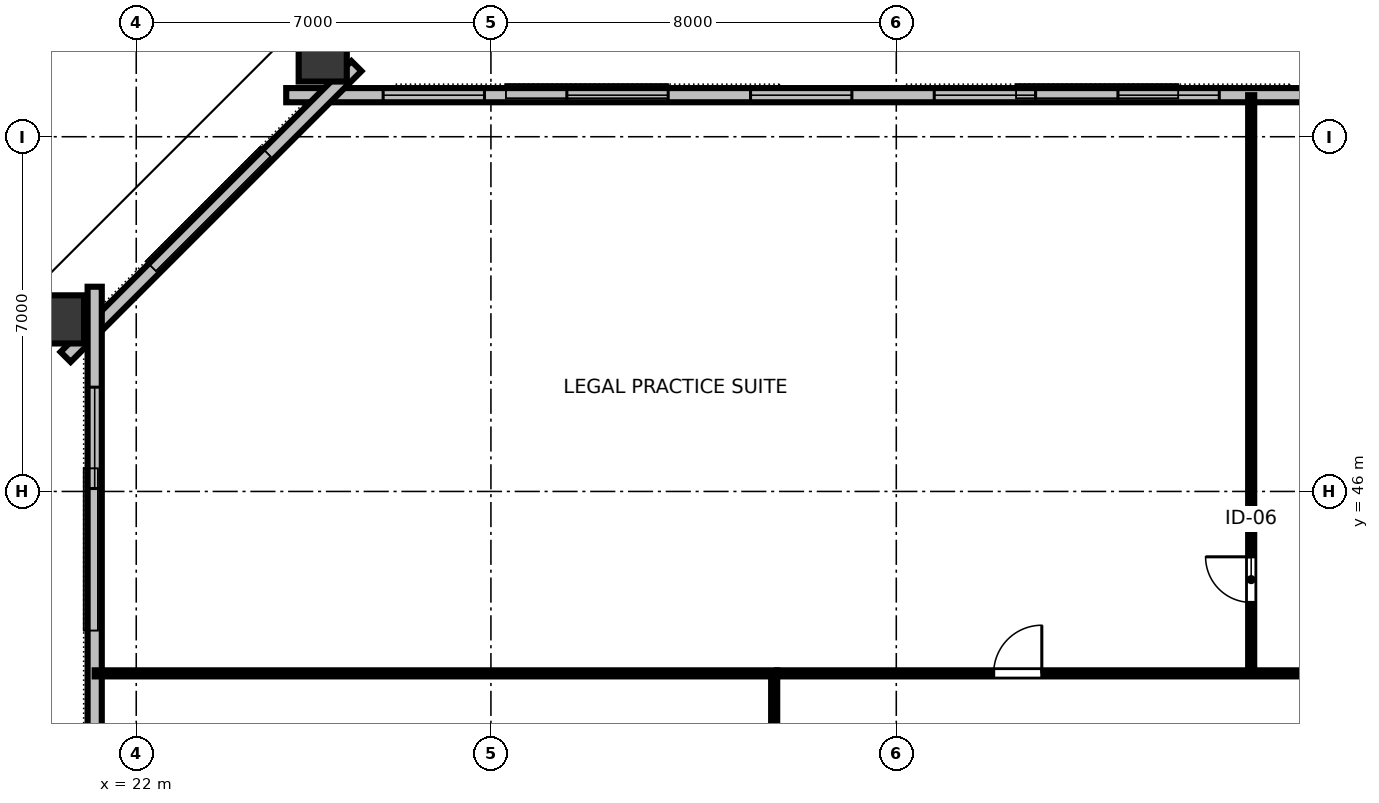
"""IFC4 building model, lengths in metres.
Left out: names, types, materials, properties, quantities, classifications, styles, units other than length and angle.
Written with IfcOpenShell. Run it as: python <this file> out.ifc"""

import sys

from ifc_helpers import new_model, si_unit, direction, frame, frame_2d, origin, origin_2d, place, context, subcontext, project, spatial, rectangle, hollow_rectangle, extrude, element, fill, save


model = new_model("IFC4")
c1 = context("Model", 3, precision=1e-05, world=origin(), true_north=direction((0.0, 1.0)))
c2 = subcontext(c1, "Body", "Model", "MODEL_VIEW")
j1 = project(units=[si_unit("LENGTHUNIT", "METRE"), si_unit("PLANEANGLEUNIT", "RADIAN")], contexts=[c1])
p1 = place(None, origin())
s1 = spatial("IfcSite", under=j1, at=p1, CompositionType="ELEMENT")
p2 = place(p1, origin())
s2 = spatial("IfcBuilding", under=s1, at=p2, CompositionType="ELEMENT")
p3 = place(p2, frame((0.0, 0.0, 74.8)))
s3 = spatial("IfcBuildingStorey", under=s2, at=p3, CompositionType="ELEMENT", Elevation=74.8)
for number, where, z_axis, x_axis in (
    (1, (25.681, 54.664, 0.0), (0.0, 0.0, 1.0), (1.0, 0.0, 0.0)),
    (2, (20.396, 49.396, 0.0), (0.0, 0.0, 1.0), (0.0, 1.0, 0.0)),
):
    element("IfcColumn", number, at=place(p3, frame(where, z_axis=z_axis, x_axis=x_axis)), inside=s3, PredefinedType="COLUMN", context=c2, shape_type="SweptSolid", body=[
        extrude(hollow_rectangle(XDim=0.95, YDim=1.15, WallThickness=0.06, at=origin_2d()), origin(), (0.0, 0.0, 1.0), 3.358),
    ])
p4 = place(p3, frame((67.04, 53.82, 0.0), z_axis=(0.0, 0.0, 1.0), x_axis=(-1.0, 0.0, 0.0)))
e3 = element("IfcWall", 3, at=p4, inside=s3, PredefinedType="STANDARD", context=c2, shape_type="SweptSolid", body=[
    extrude(rectangle(XDim=42.08, YDim=0.28, at=frame_2d((21.04, 0.0))), origin(), (0.0, 0.0, 1.0), 3.36),
])
p5 = place(p4, frame((1.913, 0.0, 0.8)))
e4 = element("IfcOpeningElement", 4, at=p5, cuts=e3, PredefinedType="OPENING", context=c2, shape_type="SweptSolid", body=[
    extrude(rectangle(XDim=2.0, YDim=1.95, at=frame_2d((1.0, 0.975))), frame((0.0, 0.15, 0.0), z_axis=(0.0, -1.0, 0.0), x_axis=(1.0, 0.0, 0.0)), (0.0, 0.0, 1.0), 0.3),
])
p6 = place(p4, frame((5.538, 0.0, 0.8)))
e5 = element("IfcOpeningElement", 5, at=p6, cuts=e3, PredefinedType="OPENING", context=c2, shape_type="SweptSolid", body=[
    extrude(rectangle(XDim=2.0, YDim=1.95, at=frame_2d((1.0, 0.975))), frame((0.0, 0.15, 0.0), z_axis=(0.0, -1.0, 0.0), x_axis=(1.0, 0.0, 0.0)), (0.0, 0.0, 1.0), 0.3),
])
p7 = place(p4, frame((9.164, 0.0, 0.8)))
e6 = element("IfcOpeningElement", 6, at=p7, cuts=e3, PredefinedType="OPENING", context=c2, shape_type="SweptSolid", body=[
    extrude(rectangle(XDim=2.0, YDim=1.95, at=frame_2d((1.0, 0.975))), frame((0.0, 0.15, 0.0), z_axis=(0.0, -1.0, 0.0), x_axis=(1.0, 0.0, 0.0)), (0.0, 0.0, 1.0), 0.3),
])
p8 = place(p4, frame((12.789, 0.0, 0.8)))
e7 = element("IfcOpeningElement", 7, at=p8, cuts=e3, PredefinedType="OPENING", context=c2, shape_type="SweptSolid", body=[
    extrude(rectangle(XDim=2.0, YDim=1.95, at=frame_2d((1.0, 0.975))), frame((0.0, 0.15, 0.0), z_axis=(0.0, -1.0, 0.0), x_axis=(1.0, 0.0, 0.0)), (0.0, 0.0, 1.0), 0.3),
])
p9 = place(p4, frame((23.666, 0.0, 0.8)))
e8 = element("IfcOpeningElement", 8, at=p9, cuts=e3, PredefinedType="OPENING", context=c2, shape_type="SweptSolid", body=[
    extrude(rectangle(XDim=2.0, YDim=1.95, at=frame_2d((1.0, 0.975))), frame((0.0, 0.15, 0.0), z_axis=(0.0, -1.0, 0.0), x_axis=(1.0, 0.0, 0.0)), (0.0, 0.0, 1.0), 0.3),
])
p10 = place(p4, frame((27.291, 0.0, 0.8)))
e9 = element("IfcOpeningElement", 9, at=p10, cuts=e3, PredefinedType="OPENING", context=c2, shape_type="SweptSolid", body=[
    extrude(rectangle(XDim=2.0, YDim=1.95, at=frame_2d((1.0, 0.975))), frame((0.0, 0.15, 0.0), z_axis=(0.0, -1.0, 0.0), x_axis=(1.0, 0.0, 0.0)), (0.0, 0.0, 1.0), 0.3),
])
p11 = place(p4, frame((30.917, 0.0, 0.8)))
e10 = element("IfcOpeningElement", 10, at=p11, cuts=e3, PredefinedType="OPENING", context=c2, shape_type="SweptSolid", body=[
    extrude(rectangle(XDim=2.0, YDim=1.95, at=frame_2d((1.0, 0.975))), frame((0.0, 0.15, 0.0), z_axis=(0.0, -1.0, 0.0), x_axis=(1.0, 0.0, 0.0)), (0.0, 0.0, 1.0), 0.3),
])
p12 = place(p4, frame((34.542, 0.0, 0.8)))
e11 = element("IfcOpeningElement", 11, at=p12, cuts=e3, PredefinedType="OPENING", context=c2, shape_type="SweptSolid", body=[
    extrude(rectangle(XDim=2.0, YDim=1.95, at=frame_2d((1.0, 0.975))), frame((0.0, 0.15, 0.0), z_axis=(0.0, -1.0, 0.0), x_axis=(1.0, 0.0, 0.0)), (0.0, 0.0, 1.0), 0.3),
])
p13 = place(p4, frame((38.167, 0.0, 0.8)))
e12 = element("IfcOpeningElement", 12, at=p13, cuts=e3, PredefinedType="OPENING", context=c2, shape_type="SweptSolid", body=[
    extrude(rectangle(XDim=2.0, YDim=1.95, at=frame_2d((1.0, 0.975))), frame((0.0, 0.15, 0.0), z_axis=(0.0, -1.0, 0.0), x_axis=(1.0, 0.0, 0.0)), (0.0, 0.0, 1.0), 0.3),
])
p14 = place(p3, frame((26.345, 54.394, 0.0), z_axis=(0.0, 0.0, 1.0), x_axis=(-0.707106781187, -0.707106781187, 0.0)))
e13 = element("IfcWall", 13, at=p14, inside=s3, PredefinedType="STANDARD", context=c2, shape_type="SweptSolid", body=[
    extrude(rectangle(XDim=8.116, YDim=0.28, at=frame_2d((4.058, 0.0))), origin(), (0.0, 0.0, 1.0), 3.36),
])
p15 = place(p3, frame((21.18, 50.04, 0.0), z_axis=(0.0, 0.0, 1.0), x_axis=(0.0, -1.0, 0.0)))
e14 = element("IfcWall", 14, at=p15, inside=s3, PredefinedType="STANDARD", context=c2, shape_type="SweptSolid", body=[
    extrude(rectangle(XDim=36.08, YDim=0.28, at=frame_2d((18.04, 0.0))), origin(), (0.0, 0.0, 1.0), 3.36),
])
p16 = place(p15, frame((1.982, 0.0, 0.8)))
e15 = element("IfcOpeningElement", 15, at=p16, cuts=e14, PredefinedType="OPENING", context=c2, shape_type="SweptSolid", body=[
    extrude(rectangle(XDim=2.0, YDim=1.95, at=frame_2d((1.0, 0.975))), frame((0.0, 0.15, 0.0), z_axis=(0.0, -1.0, 0.0), x_axis=(1.0, 0.0, 0.0)), (0.0, 0.0, 1.0), 0.3),
])
p17 = place(p15, frame((9.511, 0.0, 0.8)))
e16 = element("IfcOpeningElement", 16, at=p17, cuts=e14, PredefinedType="OPENING", context=c2, shape_type="SweptSolid", body=[
    extrude(rectangle(XDim=2.0, YDim=1.95, at=frame_2d((1.0, 0.975))), frame((0.0, 0.15, 0.0), z_axis=(0.0, -1.0, 0.0), x_axis=(1.0, 0.0, 0.0)), (0.0, 0.0, 1.0), 0.3),
])
p18 = place(p15, frame((13.276, 0.0, 0.8)))
e17 = element("IfcOpeningElement", 17, at=p18, cuts=e14, PredefinedType="OPENING", context=c2, shape_type="SweptSolid", body=[
    extrude(rectangle(XDim=2.0, YDim=1.95, at=frame_2d((1.0, 0.975))), frame((0.0, 0.15, 0.0), z_axis=(0.0, -1.0, 0.0), x_axis=(1.0, 0.0, 0.0)), (0.0, 0.0, 1.0), 0.3),
])
p19 = place(p15, frame((20.804, 0.0, 0.8)))
e18 = element("IfcOpeningElement", 18, at=p19, cuts=e14, PredefinedType="OPENING", context=c2, shape_type="SweptSolid", body=[
    extrude(rectangle(XDim=2.0, YDim=1.95, at=frame_2d((1.0, 0.975))), frame((0.0, 0.15, 0.0), z_axis=(0.0, -1.0, 0.0), x_axis=(1.0, 0.0, 0.0)), (0.0, 0.0, 1.0), 0.3),
])
p20 = place(p15, frame((24.569, 0.0, 0.8)))
e19 = element("IfcOpeningElement", 19, at=p20, cuts=e14, PredefinedType="OPENING", context=c2, shape_type="SweptSolid", body=[
    extrude(rectangle(XDim=2.0, YDim=1.95, at=frame_2d((1.0, 0.975))), frame((0.0, 0.15, 0.0), z_axis=(0.0, -1.0, 0.0), x_axis=(1.0, 0.0, 0.0)), (0.0, 0.0, 1.0), 0.3),
])
p21 = place(p15, frame((32.098, 0.0, 0.8)))
e20 = element("IfcOpeningElement", 20, at=p21, cuts=e14, PredefinedType="OPENING", context=c2, shape_type="SweptSolid", body=[
    extrude(rectangle(XDim=2.0, YDim=1.95, at=frame_2d((1.0, 0.975))), frame((0.0, 0.15, 0.0), z_axis=(0.0, -1.0, 0.0), x_axis=(1.0, 0.0, 0.0)), (0.0, 0.0, 1.0), 0.3),
])
p22 = place(p3, frame((44.004, 42.41, 0.0), z_axis=(0.0, 0.0, 1.0), x_axis=(0.0, 1.0, 0.0)))
e21 = element("IfcWall", 21, at=p22, inside=s3, PredefinedType="PARTITIONING", context=c2, shape_type="SweptSolid", body=[
    extrude(rectangle(XDim=11.41, YDim=0.12, at=frame_2d((5.705, 0.0))), origin(), (0.0, 0.0, 1.0), 2.64),
])
p23 = place(p22, frame((1.4, 0.0, 0.0)))
e22 = element("IfcOpeningElement", 22, at=p23, cuts=e21, PredefinedType="OPENING", context=c2, shape_type="SweptSolid", body=[
    extrude(rectangle(XDim=0.9, YDim=2.15, at=frame_2d((0.45, 1.075))), frame((0.0, 0.07, 0.0), z_axis=(0.0, -1.0, 0.0), x_axis=(1.0, 0.0, 0.0)), (0.0, 0.0, 1.0), 0.14),
])
p24 = place(p3, frame((34.65, 42.41, 0.0), z_axis=(0.0, 0.0, 1.0), x_axis=(1.0, 0.0, 0.0)))
e23 = element("IfcWall", 23, at=p24, inside=s3, PredefinedType="PARTITIONING", context=c2, shape_type="SweptSolid", body=[
    extrude(rectangle(XDim=22.7, YDim=0.12, at=frame_2d((11.35, 0.0))), origin(), (0.0, 0.0, 1.0), 2.64),
])
p25 = place(p24, frame((4.272, 0.0, 0.0)))
e24 = element("IfcOpeningElement", 24, at=p25, cuts=e23, PredefinedType="OPENING", context=c2, shape_type="SweptSolid", body=[
    extrude(rectangle(XDim=0.95, YDim=2.15, at=frame_2d((0.475, 1.075))), frame((0.0, 0.07, 0.0), z_axis=(0.0, -1.0, 0.0), x_axis=(1.0, 0.0, 0.0)), (0.0, 0.0, 1.0), 0.14),
])
p26 = place(p24, frame((11.432, 0.0, 0.0)))
e25 = element("IfcOpeningElement", 25, at=p26, cuts=e23, PredefinedType="OPENING", context=c2, shape_type="SweptSolid", body=[
    extrude(rectangle(XDim=0.95, YDim=2.15, at=frame_2d((0.475, 1.075))), frame((0.0, 0.07, 0.0), z_axis=(0.0, -1.0, 0.0), x_axis=(1.0, 0.0, 0.0)), (0.0, 0.0, 1.0), 0.14),
])
p27 = place(p24, frame((18.035, 0.0, 0.0)))
e26 = element("IfcOpeningElement", 26, at=p27, cuts=e23, PredefinedType="OPENING", context=c2, shape_type="SweptSolid", body=[
    extrude(rectangle(XDim=0.95, YDim=2.15, at=frame_2d((0.475, 1.075))), frame((0.0, 0.07, 0.0), z_axis=(0.0, -1.0, 0.0), x_axis=(1.0, 0.0, 0.0)), (0.0, 0.0, 1.0), 0.14),
])
p28 = place(p3, frame((34.59, 21.65, 0.0), z_axis=(0.0, 0.0, 1.0), x_axis=(0.0, 1.0, 0.0)))
e27 = element("IfcWall", 27, at=p28, inside=s3, PredefinedType="PARTITIONING", context=c2, shape_type="SweptSolid", body=[
    extrude(rectangle(XDim=20.7, YDim=0.12, at=frame_2d((10.35, 0.0))), origin(), (0.0, 0.0, 1.0), 2.64),
])
p29 = place(p28, frame((2.105, 0.0, 0.0)))
e28 = element("IfcOpeningElement", 28, at=p29, cuts=e27, PredefinedType="OPENING", context=c2, shape_type="SweptSolid", body=[
    extrude(rectangle(XDim=0.95, YDim=2.15, at=frame_2d((0.475, 1.075))), frame((0.0, 0.07, 0.0), z_axis=(0.0, -1.0, 0.0), x_axis=(1.0, 0.0, 0.0)), (0.0, 0.0, 1.0), 0.14),
])
p30 = place(p28, frame((7.369, 0.0, 0.0)))
e29 = element("IfcOpeningElement", 29, at=p30, cuts=e27, PredefinedType="OPENING", context=c2, shape_type="SweptSolid", body=[
    extrude(rectangle(XDim=0.95, YDim=2.15, at=frame_2d((0.475, 1.075))), frame((0.0, 0.07, 0.0), z_axis=(0.0, -1.0, 0.0), x_axis=(1.0, 0.0, 0.0)), (0.0, 0.0, 1.0), 0.14),
])
p31 = place(p28, frame((15.139, 0.0, 0.0)))
e30 = element("IfcOpeningElement", 30, at=p31, cuts=e27, PredefinedType="OPENING", context=c2, shape_type="SweptSolid", body=[
    extrude(rectangle(XDim=0.95, YDim=2.15, at=frame_2d((0.475, 1.075))), frame((0.0, 0.07, 0.0), z_axis=(0.0, -1.0, 0.0), x_axis=(1.0, 0.0, 0.0)), (0.0, 0.0, 1.0), 0.14),
])
p32 = place(p3, frame((34.65, 42.41, 0.0), z_axis=(0.0, 0.0, 1.0), x_axis=(-1.0, 0.0, 0.0)))
e31 = element("IfcWall", 31, at=p32, inside=s3, PredefinedType="PARTITIONING", context=c2, shape_type="SweptSolid", body=[
    extrude(rectangle(XDim=13.47, YDim=0.12, at=frame_2d((6.735, 0.0))), origin(), (0.0, 0.0, 1.0), 2.64),
])
p33 = place(p9, origin())
e32 = element("IfcWindow", 32, at=p33, inside=s3, PartitioningType="SINGLE_PANEL", PredefinedType="WINDOW", context=c2, shape_type="SweptSolid", body=[
    extrude(rectangle(XDim=2.0, YDim=1.95, at=frame_2d((1.0, 0.975))), frame((0.0, 0.03, 0.0), z_axis=(0.0, -1.0, 0.0), x_axis=(1.0, 0.0, 0.0)), (0.0, 0.0, 1.0), 0.06),
])
fill(e8, e32)
p34 = place(p10, origin())
e33 = element("IfcWindow", 33, at=p34, inside=s3, PartitioningType="SINGLE_PANEL", PredefinedType="WINDOW", context=c2, shape_type="SweptSolid", body=[
    extrude(rectangle(XDim=2.0, YDim=1.95, at=frame_2d((1.0, 0.975))), frame((0.0, 0.03, 0.0), z_axis=(0.0, -1.0, 0.0), x_axis=(1.0, 0.0, 0.0)), (0.0, 0.0, 1.0), 0.06),
])
fill(e9, e33)
p35 = place(p11, origin())
e34 = element("IfcWindow", 34, at=p35, inside=s3, PartitioningType="SINGLE_PANEL", PredefinedType="WINDOW", context=c2, shape_type="SweptSolid", body=[
    extrude(rectangle(XDim=2.0, YDim=1.95, at=frame_2d((1.0, 0.975))), frame((0.0, 0.03, 0.0), z_axis=(0.0, -1.0, 0.0), x_axis=(1.0, 0.0, 0.0)), (0.0, 0.0, 1.0), 0.06),
])
fill(e10, e34)
p36 = place(p12, origin())
e35 = element("IfcWindow", 35, at=p36, inside=s3, PartitioningType="SINGLE_PANEL", PredefinedType="WINDOW", context=c2, shape_type="SweptSolid", body=[
    extrude(rectangle(XDim=2.0, YDim=1.95, at=frame_2d((1.0, 0.975))), frame((0.0, 0.03, 0.0), z_axis=(0.0, -1.0, 0.0), x_axis=(1.0, 0.0, 0.0)), (0.0, 0.0, 1.0), 0.06),
])
fill(e11, e35)
p37 = place(p13, origin())
e36 = element("IfcWindow", 36, at=p37, inside=s3, PartitioningType="SINGLE_PANEL", PredefinedType="WINDOW", context=c2, shape_type="SweptSolid", body=[
    extrude(rectangle(XDim=2.0, YDim=1.95, at=frame_2d((1.0, 0.975))), frame((0.0, 0.03, 0.0), z_axis=(0.0, -1.0, 0.0), x_axis=(1.0, 0.0, 0.0)), (0.0, 0.0, 1.0), 0.06),
])
fill(e12, e36)
p38 = place(p16, origin())
e37 = element("IfcWindow", 37, at=p38, inside=s3, PartitioningType="SINGLE_PANEL", PredefinedType="WINDOW", context=c2, shape_type="SweptSolid", body=[
    extrude(rectangle(XDim=2.0, YDim=1.95, at=frame_2d((1.0, 0.975))), frame((0.0, 0.03, 0.0), z_axis=(0.0, -1.0, 0.0), x_axis=(1.0, 0.0, 0.0)), (0.0, 0.0, 1.0), 0.06),
])
fill(e15, e37)
p39 = place(p23, origin())
e38 = element("IfcDoor", 38, at=p39, inside=s3, OperationType="SINGLE_SWING_RIGHT", PredefinedType="DOOR", context=c2, shape_type="SweptSolid", body=[
    extrude(rectangle(XDim=0.9, YDim=2.15, at=frame_2d((0.45, 1.075))), frame((0.0, 0.025, 0.0), z_axis=(0.0, -1.0, 0.0), x_axis=(1.0, 0.0, 0.0)), (0.0, 0.0, 1.0), 0.05),
])
fill(e22, e38)
p40 = place(p25, origin())
e39 = element("IfcDoor", 39, at=p40, inside=s3, OperationType="SINGLE_SWING_RIGHT", PredefinedType="DOOR", context=c2, shape_type="SweptSolid", body=[
    extrude(rectangle(XDim=0.95, YDim=2.15, at=frame_2d((0.475, 1.075))), frame((0.0, 0.025, 0.0), z_axis=(0.0, -1.0, 0.0), x_axis=(1.0, 0.0, 0.0)), (0.0, 0.0, 1.0), 0.05),
])
fill(e24, e39)
save(model, sys.argv[1])
